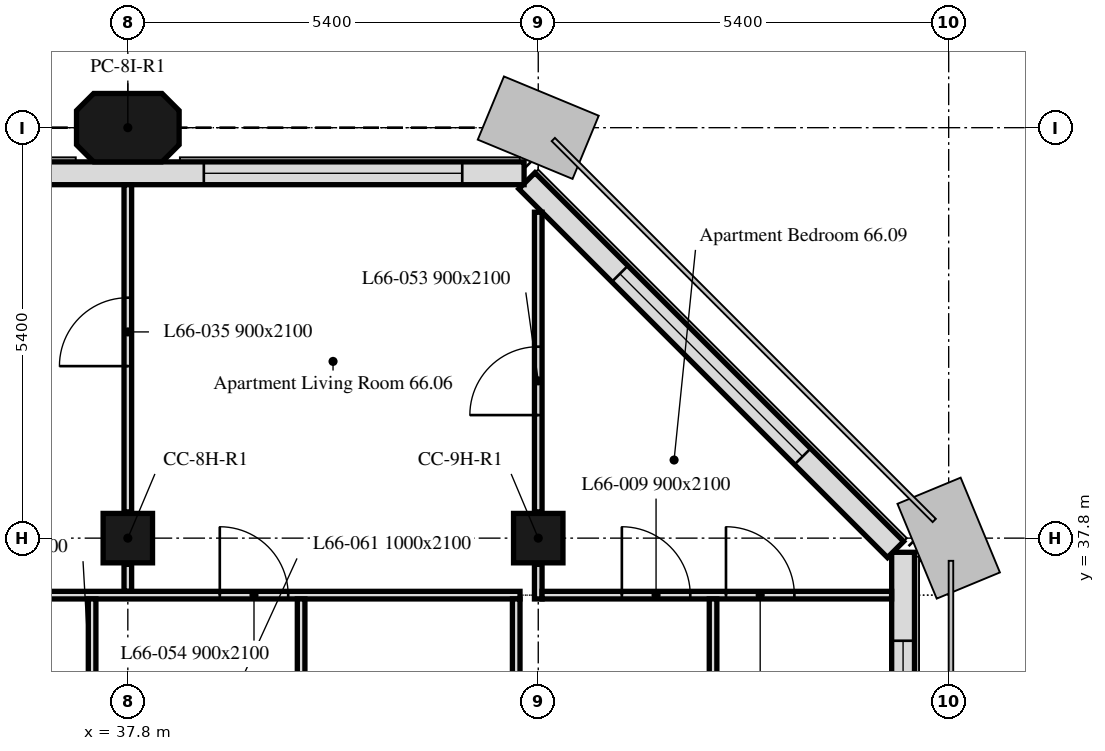
"""IFC4 building model, lengths in metres.
Left out: names, types, materials, properties, quantities, classifications, styles, units other than length and angle.
Written with IfcOpenShell. Run it as: python <this file> out.ifc"""

import sys

from ifc_helpers import new_model, si_unit, direction, frame, frame_2d, origin, origin_2d, place, context, subcontext, project, spatial, polyline, rectangle, outline, extrude, element, fill, save


model = new_model("IFC4")
c1 = context("Model", 3, precision=1e-05, world=origin(), true_north=direction((0.0, 1.0)))
c2 = subcontext(c1, "Body", "Model", "MODEL_VIEW")
j1 = project(units=[si_unit("LENGTHUNIT", "METRE"), si_unit("PLANEANGLEUNIT", "RADIAN")], contexts=[c1])
p1 = place(None, origin())
s1 = spatial("IfcSite", under=j1, at=p1, CompositionType="ELEMENT")
p2 = place(p1, origin())
s2 = spatial("IfcBuilding", under=s1, at=p2, CompositionType="ELEMENT")
p3 = place(p2, frame((0.0, 0.0, 271.9)))
s3 = spatial("IfcBuildingStorey", under=s2, at=p3, CompositionType="ELEMENT", Elevation=271.9)
for number, where, z_axis, x_axis in (
    (1, (37.8, 37.8, 0.0), (0.0, 0.0, 1.0), (1.0, 0.0, 0.0)),
    (2, (43.2, 37.8, 0.0), (0.0, 0.0, 1.0), (1.0, 0.0, 0.0)),
):
    element("IfcColumn", number, at=place(p3, frame(where, z_axis=z_axis, x_axis=x_axis)), inside=s3, PredefinedType="COLUMN", context=c2, shape_type="SweptSolid", body=[
        extrude(rectangle(XDim=0.65, YDim=0.65, at=origin_2d()), origin(), (0.0, 0.0, 1.0), 3.0),
    ])
p4 = place(p3, frame((37.8, 43.2, 0.0), z_axis=(0.0, 0.0, 1.0), x_axis=(1.0, 0.0, 0.0)))
e3 = element("IfcColumn", 3, at=p4, inside=s3, PredefinedType="COLUMN", context=c2, shape_type="SweptSolid", body=[
    extrude(outline(polyline([(-0.45, -0.45), (0.45, -0.45), (0.675, -0.225), (0.675, 0.225), (0.45, 0.45), (-0.45, 0.45), (-0.675, 0.225), (-0.675, -0.225), (-0.45, -0.45)])), origin(), (0.0, 0.0, 1.0), 3.0),
])
p5 = place(p3, frame((48.0, 5.586, 0.0), z_axis=(0.0, 0.0, 1.0), x_axis=(0.0, 1.0, 0.0)))
e4 = element("IfcWall", 4, at=p5, inside=s3, PredefinedType="SOLIDWALL", context=c2, shape_type="SweptSolid", body=[
    extrude(rectangle(XDim=32.027, YDim=0.3, at=frame_2d((16.014, 0.0))), origin(), (0.0, 0.0, 1.0), 3.0),
])
p6 = place(p5, frame((1.314, 0.0, 0.9)))
e5 = element("IfcOpeningElement", 5, at=p6, cuts=e4, PredefinedType="OPENING", context=c2, shape_type="SweptSolid", body=[
    extrude(rectangle(XDim=1.1, YDim=1.7, at=frame_2d((0.55, 0.85))), frame((0.0, 0.16, 0.0), z_axis=(0.0, -1.0, 0.0), x_axis=(1.0, 0.0, 0.0)), (0.0, 0.0, 1.0), 0.32),
])
p7 = place(p5, frame((2.764, 0.0, 0.9)))
e6 = element("IfcOpeningElement", 6, at=p7, cuts=e4, PredefinedType="OPENING", context=c2, shape_type="SweptSolid", body=[
    extrude(rectangle(XDim=1.1, YDim=1.7, at=frame_2d((0.55, 0.85))), frame((0.0, 0.16, 0.0), z_axis=(0.0, -1.0, 0.0), x_axis=(1.0, 0.0, 0.0)), (0.0, 0.0, 1.0), 0.32),
])
p8 = place(p5, frame((6.564, 0.0, 0.9)))
e7 = element("IfcOpeningElement", 7, at=p8, cuts=e4, PredefinedType="OPENING", context=c2, shape_type="SweptSolid", body=[
    extrude(rectangle(XDim=1.1, YDim=1.7, at=frame_2d((0.55, 0.85))), frame((0.0, 0.16, 0.0), z_axis=(0.0, -1.0, 0.0), x_axis=(1.0, 0.0, 0.0)), (0.0, 0.0, 1.0), 0.32),
])
p9 = place(p5, frame((8.514, 0.0, 0.9)))
e8 = element("IfcOpeningElement", 8, at=p9, cuts=e4, PredefinedType="OPENING", context=c2, shape_type="SweptSolid", body=[
    extrude(rectangle(XDim=1.1, YDim=1.7, at=frame_2d((0.55, 0.85))), frame((0.0, 0.16, 0.0), z_axis=(0.0, -1.0, 0.0), x_axis=(1.0, 0.0, 0.0)), (0.0, 0.0, 1.0), 0.32),
])
p10 = place(p5, frame((11.614, 0.0, 0.9)))
e9 = element("IfcOpeningElement", 9, at=p10, cuts=e4, PredefinedType="OPENING", context=c2, shape_type="SweptSolid", body=[
    extrude(rectangle(XDim=3.4, YDim=1.7, at=frame_2d((1.7, 0.85))), frame((0.0, 0.16, 0.0), z_axis=(0.0, -1.0, 0.0), x_axis=(1.0, 0.0, 0.0)), (0.0, 0.0, 1.0), 0.32),
])
p11 = place(p5, frame((17.364, 0.0, 0.9)))
e10 = element("IfcOpeningElement", 10, at=p11, cuts=e4, PredefinedType="OPENING", context=c2, shape_type="SweptSolid", body=[
    extrude(rectangle(XDim=1.1, YDim=1.7, at=frame_2d((0.55, 0.85))), frame((0.0, 0.16, 0.0), z_axis=(0.0, -1.0, 0.0), x_axis=(1.0, 0.0, 0.0)), (0.0, 0.0, 1.0), 0.32),
])
p12 = place(p5, frame((18.964, 0.0, 0.9)))
e11 = element("IfcOpeningElement", 11, at=p12, cuts=e4, PredefinedType="OPENING", context=c2, shape_type="SweptSolid", body=[
    extrude(rectangle(XDim=1.1, YDim=1.7, at=frame_2d((0.55, 0.85))), frame((0.0, 0.16, 0.0), z_axis=(0.0, -1.0, 0.0), x_axis=(1.0, 0.0, 0.0)), (0.0, 0.0, 1.0), 0.32),
])
p13 = place(p5, frame((22.414, 0.0, 0.9)))
e12 = element("IfcOpeningElement", 12, at=p13, cuts=e4, PredefinedType="OPENING", context=c2, shape_type="SweptSolid", body=[
    extrude(rectangle(XDim=3.4, YDim=1.7, at=frame_2d((1.7, 0.85))), frame((0.0, 0.16, 0.0), z_axis=(0.0, -1.0, 0.0), x_axis=(1.0, 0.0, 0.0)), (0.0, 0.0, 1.0), 0.32),
])
p14 = place(p5, frame((28.239, 0.0, 0.9)))
e13 = element("IfcOpeningElement", 13, at=p14, cuts=e4, PredefinedType="OPENING", context=c2, shape_type="SweptSolid", body=[
    extrude(rectangle(XDim=0.65, YDim=1.7, at=frame_2d((0.325, 0.85))), frame((0.0, 0.16, 0.0), z_axis=(0.0, -1.0, 0.0), x_axis=(1.0, 0.0, 0.0)), (0.0, 0.0, 1.0), 0.32),
])
p15 = place(p5, frame((29.764, 0.0, 0.9)))
e14 = element("IfcOpeningElement", 14, at=p15, cuts=e4, PredefinedType="OPENING", context=c2, shape_type="SweptSolid", body=[
    extrude(rectangle(XDim=1.1, YDim=1.7, at=frame_2d((0.55, 0.85))), frame((0.0, 0.16, 0.0), z_axis=(0.0, -1.0, 0.0), x_axis=(1.0, 0.0, 0.0)), (0.0, 0.0, 1.0), 0.32),
])
p16 = place(p3, frame((47.901, 37.65, 0.0), z_axis=(0.0, 0.0, 1.0), x_axis=(-0.707106781187, 0.707106781187, 0.0)))
e15 = element("IfcWall", 15, at=p16, inside=s3, PredefinedType="SOLIDWALL", context=c2, shape_type="SweptSolid", body=[
    extrude(rectangle(XDim=6.86, YDim=0.3, at=frame_2d((3.43, 0.0))), origin(), (0.0, 0.0, 1.0), 3.0),
])
p17 = place(p16, frame((1.73, 0.0, 0.9)))
e16 = element("IfcOpeningElement", 16, at=p17, cuts=e15, PredefinedType="OPENING", context=c2, shape_type="SweptSolid", body=[
    extrude(rectangle(XDim=3.4, YDim=1.7, at=frame_2d((1.7, 0.85))), frame((0.0, 0.16, 0.0), z_axis=(0.0, -1.0, 0.0), x_axis=(1.0, 0.0, 0.0)), (0.0, 0.0, 1.0), 0.32),
])
p18 = place(p3, frame((43.014, 42.6, 0.0), z_axis=(0.0, 0.0, 1.0), x_axis=(-1.0, 0.0, 0.0)))
e17 = element("IfcWall", 17, at=p18, inside=s3, PredefinedType="SOLIDWALL", context=c2, shape_type="SweptSolid", body=[
    extrude(rectangle(XDim=32.027, YDim=0.3, at=frame_2d((16.014, 0.0))), origin(), (0.0, 0.0, 1.0), 3.0),
])
p19 = place(p18, frame((0.814, 0.0, 0.9)))
e18 = element("IfcOpeningElement", 18, at=p19, cuts=e17, PredefinedType="OPENING", context=c2, shape_type="SweptSolid", body=[
    extrude(rectangle(XDim=3.4, YDim=1.7, at=frame_2d((1.7, 0.85))), frame((0.0, 0.16, 0.0), z_axis=(0.0, -1.0, 0.0), x_axis=(1.0, 0.0, 0.0)), (0.0, 0.0, 1.0), 0.32),
])
p20 = place(p18, frame((6.564, 0.0, 0.9)))
e19 = element("IfcOpeningElement", 19, at=p20, cuts=e17, PredefinedType="OPENING", context=c2, shape_type="SweptSolid", body=[
    extrude(rectangle(XDim=1.1, YDim=1.7, at=frame_2d((0.55, 0.85))), frame((0.0, 0.16, 0.0), z_axis=(0.0, -1.0, 0.0), x_axis=(1.0, 0.0, 0.0)), (0.0, 0.0, 1.0), 0.32),
])
p21 = place(p18, frame((11.614, 0.0, 0.9)))
e20 = element("IfcOpeningElement", 20, at=p21, cuts=e17, PredefinedType="OPENING", context=c2, shape_type="SweptSolid", body=[
    extrude(rectangle(XDim=3.4, YDim=1.7, at=frame_2d((1.7, 0.85))), frame((0.0, 0.16, 0.0), z_axis=(0.0, -1.0, 0.0), x_axis=(1.0, 0.0, 0.0)), (0.0, 0.0, 1.0), 0.32),
])
p22 = place(p18, frame((17.364, 0.0, 0.9)))
e21 = element("IfcOpeningElement", 21, at=p22, cuts=e17, PredefinedType="OPENING", context=c2, shape_type="SweptSolid", body=[
    extrude(rectangle(XDim=1.1, YDim=1.7, at=frame_2d((0.55, 0.85))), frame((0.0, 0.16, 0.0), z_axis=(0.0, -1.0, 0.0), x_axis=(1.0, 0.0, 0.0)), (0.0, 0.0, 1.0), 0.32),
])
p23 = place(p18, frame((22.414, 0.0, 0.9)))
e22 = element("IfcOpeningElement", 22, at=p23, cuts=e17, PredefinedType="OPENING", context=c2, shape_type="SweptSolid", body=[
    extrude(rectangle(XDim=3.4, YDim=1.7, at=frame_2d((1.7, 0.85))), frame((0.0, 0.16, 0.0), z_axis=(0.0, -1.0, 0.0), x_axis=(1.0, 0.0, 0.0)), (0.0, 0.0, 1.0), 0.32),
])
p24 = place(p18, frame((28.164, 0.0, 0.9)))
e23 = element("IfcOpeningElement", 23, at=p24, cuts=e17, PredefinedType="OPENING", context=c2, shape_type="SweptSolid", body=[
    extrude(rectangle(XDim=1.1, YDim=1.7, at=frame_2d((0.55, 0.85))), frame((0.0, 0.16, 0.0), z_axis=(0.0, -1.0, 0.0), x_axis=(1.0, 0.0, 0.0)), (0.0, 0.0, 1.0), 0.32),
])
p25 = place(p3, frame((37.8, 37.1, 0.0), z_axis=(0.0, 0.0, 1.0), x_axis=(0.0, 1.0, 0.0)))
e24 = element("IfcWall", 24, at=p25, inside=s3, PredefinedType="PARTITIONING", context=c2, shape_type="SweptSolid", body=[
    extrude(rectangle(XDim=0.355, YDim=0.1, at=frame_2d((0.177, 0.0))), origin(), (0.0, 0.0, 1.0), 3.0),
])
p26 = place(p3, frame((37.8, 38.145, 0.0), z_axis=(0.0, 0.0, 1.0), x_axis=(0.0, 1.0, 0.0)))
e25 = element("IfcWall", 25, at=p26, inside=s3, PredefinedType="PARTITIONING", context=c2, shape_type="SweptSolid", body=[
    extrude(rectangle(XDim=4.304, YDim=0.1, at=frame_2d((2.152, 0.0))), origin(), (0.0, 0.0, 1.0), 3.0),
])
p27 = place(p26, frame((1.918, 0.0, 0.0)))
e26 = element("IfcOpeningElement", 26, at=p27, cuts=e25, PredefinedType="OPENING", context=c2, shape_type="SweptSolid", body=[
    extrude(rectangle(XDim=0.9, YDim=2.1, at=frame_2d((0.45, 1.05))), frame((0.0, 0.05, 0.0), z_axis=(0.0, -1.0, 0.0), x_axis=(1.0, 0.0, 0.0)), (0.0, 0.0, 1.0), 0.1),
])
p28 = place(p3, frame((32.475, 37.05, 0.0), z_axis=(0.0, 0.0, 1.0), x_axis=(1.0, 0.0, 0.0)))
e27 = element("IfcWall", 27, at=p28, inside=s3, PredefinedType="PARTITIONING", context=c2, shape_type="SweptSolid", body=[
    extrude(rectangle(XDim=10.485, YDim=0.1, at=frame_2d((5.242, 0.0))), origin(), (0.0, 0.0, 1.0), 3.0),
])
p29 = place(p28, frame((1.275, 0.0, 0.0)))
e28 = element("IfcOpeningElement", 28, at=p29, cuts=e27, PredefinedType="OPENING", context=c2, shape_type="SweptSolid", body=[
    extrude(rectangle(XDim=0.9, YDim=2.1, at=frame_2d((0.45, 1.05))), frame((0.0, 0.05, 0.0), z_axis=(0.0, -1.0, 0.0), x_axis=(1.0, 0.0, 0.0)), (0.0, 0.0, 1.0), 0.1),
])
p30 = place(p28, frame((6.535, 0.0, 0.0)))
e29 = element("IfcOpeningElement", 29, at=p30, cuts=e27, PredefinedType="OPENING", context=c2, shape_type="SweptSolid", body=[
    extrude(rectangle(XDim=0.9, YDim=2.1, at=frame_2d((0.45, 1.05))), frame((0.0, 0.05, 0.0), z_axis=(0.0, -1.0, 0.0), x_axis=(1.0, 0.0, 0.0)), (0.0, 0.0, 1.0), 0.1),
])
p31 = place(p3, frame((43.2, 37.0, 0.0), z_axis=(0.0, 0.0, 1.0), x_axis=(0.0, 1.0, 0.0)))
e30 = element("IfcWall", 30, at=p31, inside=s3, PredefinedType="PARTITIONING", context=c2, shape_type="SweptSolid", body=[
    extrude(rectangle(XDim=0.455, YDim=0.1, at=frame_2d((0.228, 0.0))), origin(), (0.0, 0.0, 1.0), 3.0),
])
p32 = place(p3, frame((43.2, 38.145, 0.0), z_axis=(0.0, 0.0, 1.0), x_axis=(0.0, 1.0, 0.0)))
e31 = element("IfcWall", 31, at=p32, inside=s3, PredefinedType="PARTITIONING", context=c2, shape_type="SweptSolid", body=[
    extrude(rectangle(XDim=3.943, YDim=0.1, at=frame_2d((1.971, 0.0))), origin(), (0.0, 0.0, 1.0), 3.0),
])
p33 = place(p32, frame((1.274, 0.0, 0.0)))
e32 = element("IfcOpeningElement", 32, at=p33, cuts=e31, PredefinedType="OPENING", context=c2, shape_type="SweptSolid", body=[
    extrude(rectangle(XDim=0.9, YDim=2.1, at=frame_2d((0.45, 1.05))), frame((0.0, 0.05, 0.0), z_axis=(0.0, -1.0, 0.0), x_axis=(1.0, 0.0, 0.0)), (0.0, 0.0, 1.0), 0.1),
])
p34 = place(p3, frame((43.25, 37.05, 0.0), z_axis=(0.0, 0.0, 1.0), x_axis=(1.0, 0.0, 0.0)))
e33 = element("IfcWall", 33, at=p34, inside=s3, PredefinedType="PARTITIONING", context=c2, shape_type="SweptSolid", body=[
    extrude(rectangle(XDim=4.599, YDim=0.1, at=frame_2d((2.3, 0.0))), origin(), (0.0, 0.0, 1.0), 3.0),
])
p35 = place(p34, frame((1.05, 0.0, 0.0)))
e34 = element("IfcOpeningElement", 34, at=p35, cuts=e33, PredefinedType="OPENING", context=c2, shape_type="SweptSolid", body=[
    extrude(rectangle(XDim=0.9, YDim=2.1, at=frame_2d((0.45, 1.05))), frame((0.0, 0.05, 0.0), z_axis=(0.0, -1.0, 0.0), x_axis=(1.0, 0.0, 0.0)), (0.0, 0.0, 1.0), 0.1),
])
p36 = place(p34, frame((2.42, 0.0, 0.0)))
e35 = element("IfcOpeningElement", 35, at=p36, cuts=e33, PredefinedType="OPENING", context=c2, shape_type="SweptSolid", body=[
    extrude(rectangle(XDim=0.9, YDim=2.1, at=frame_2d((0.45, 1.05))), frame((0.0, 0.05, 0.0), z_axis=(0.0, -1.0, 0.0), x_axis=(1.0, 0.0, 0.0)), (0.0, 0.0, 1.0), 0.1),
])
p37 = place(p3, frame((37.33, 34.725, 0.0), z_axis=(0.0, 0.0, 1.0), x_axis=(0.0, 1.0, 0.0)))
e36 = element("IfcWall", 36, at=p37, inside=s3, PredefinedType="PARTITIONING", context=c2, shape_type="SweptSolid", body=[
    extrude(rectangle(XDim=2.275, YDim=0.1, at=frame_2d((1.137, 0.0))), origin(), (0.0, 0.0, 1.0), 3.0),
])
p38 = place(p37, frame((0.25, 0.0, 0.0)))
e37 = element("IfcOpeningElement", 37, at=p38, cuts=e36, PredefinedType="OPENING", context=c2, shape_type="SweptSolid", body=[
    extrude(rectangle(XDim=0.9, YDim=2.1, at=frame_2d((0.45, 1.05))), frame((0.0, 0.05, 0.0), z_axis=(0.0, -1.0, 0.0), x_axis=(1.0, 0.0, 0.0)), (0.0, 0.0, 1.0), 0.1),
])
p39 = place(p3, frame((40.08, 34.725, 0.0), z_axis=(0.0, 0.0, 1.0), x_axis=(0.0, 1.0, 0.0)))
e38 = element("IfcWall", 38, at=p39, inside=s3, PredefinedType="PARTITIONING", context=c2, shape_type="SweptSolid", body=[
    extrude(rectangle(XDim=2.275, YDim=0.1, at=frame_2d((1.137, 0.0))), origin(), (0.0, 0.0, 1.0), 3.0),
])
p40 = place(p39, frame((0.25, 0.0, 0.0)))
e39 = element("IfcOpeningElement", 39, at=p40, cuts=e38, PredefinedType="OPENING", context=c2, shape_type="SweptSolid", body=[
    extrude(rectangle(XDim=0.9, YDim=2.1, at=frame_2d((0.45, 1.05))), frame((0.0, 0.05, 0.0), z_axis=(0.0, -1.0, 0.0), x_axis=(1.0, 0.0, 0.0)), (0.0, 0.0, 1.0), 0.1),
])
for number, where, z_axis, x_axis in (
    (40, (42.91, 34.725, 0.0), (0.0, 0.0, 1.0), (0.0, 1.0, 0.0)),
    (41, (45.5, 34.725, 0.0), (0.0, 0.0, 1.0), (0.0, 1.0, 0.0)),
):
    element("IfcWall", number, at=place(p3, frame(where, z_axis=z_axis, x_axis=x_axis)), inside=s3, PredefinedType="PARTITIONING", context=c2, shape_type="SweptSolid", body=[
        extrude(rectangle(XDim=2.275, YDim=0.1, at=frame_2d((1.137, 0.0))), origin(), (0.0, 0.0, 1.0), 3.0),
    ])
p41 = place(p15, origin())
e42 = element("IfcWindow", 42, at=p41, inside=s3, PartitioningType="SINGLE_PANEL", PredefinedType="WINDOW", context=c2, shape_type="SweptSolid", body=[
    extrude(rectangle(XDim=1.1, YDim=1.7, at=frame_2d((0.55, 0.85))), frame((0.0, 0.03, 0.0), z_axis=(0.0, -1.0, 0.0), x_axis=(1.0, 0.0, 0.0)), (0.0, 0.0, 1.0), 0.06),
])
fill(e14, e42)
p42 = place(p17, origin())
e43 = element("IfcWindow", 43, at=p42, inside=s3, PartitioningType="SINGLE_PANEL", PredefinedType="WINDOW", context=c2, shape_type="SweptSolid", body=[
    extrude(rectangle(XDim=3.4, YDim=1.7, at=frame_2d((1.7, 0.85))), frame((0.0, 0.03, 0.0), z_axis=(0.0, -1.0, 0.0), x_axis=(1.0, 0.0, 0.0)), (0.0, 0.0, 1.0), 0.06),
])
fill(e16, e43)
p43 = place(p19, origin())
e44 = element("IfcWindow", 44, at=p43, inside=s3, PartitioningType="SINGLE_PANEL", PredefinedType="WINDOW", context=c2, shape_type="SweptSolid", body=[
    extrude(rectangle(XDim=3.4, YDim=1.7, at=frame_2d((1.7, 0.85))), frame((0.0, 0.03, 0.0), z_axis=(0.0, -1.0, 0.0), x_axis=(1.0, 0.0, 0.0)), (0.0, 0.0, 1.0), 0.06),
])
fill(e18, e44)
p44 = place(p35, origin())
e45 = element("IfcDoor", 45, at=p44, inside=s3, OperationType="SINGLE_SWING_LEFT", PredefinedType="DOOR", context=c2, shape_type="SweptSolid", body=[
    extrude(rectangle(XDim=0.9, YDim=2.1, at=frame_2d((0.45, 1.05))), frame((0.0, 0.025, 0.0), z_axis=(0.0, -1.0, 0.0), x_axis=(1.0, 0.0, 0.0)), (0.0, 0.0, 1.0), 0.05),
])
fill(e34, e45)
p45 = place(p36, origin())
e46 = element("IfcDoor", 46, at=p45, inside=s3, OperationType="SINGLE_SWING_RIGHT", PredefinedType="DOOR", context=c2, shape_type="SweptSolid", body=[
    extrude(rectangle(XDim=0.9, YDim=2.1, at=frame_2d((0.45, 1.05))), frame((0.0, 0.025, 0.0), z_axis=(0.0, -1.0, 0.0), x_axis=(1.0, 0.0, 0.0)), (0.0, 0.0, 1.0), 0.05),
])
fill(e35, e46)
p46 = place(p27, origin())
e47 = element("IfcDoor", 47, at=p46, inside=s3, OperationType="SINGLE_SWING_RIGHT", PredefinedType="DOOR", context=c2, shape_type="SweptSolid", body=[
    extrude(rectangle(XDim=0.9, YDim=2.1, at=frame_2d((0.45, 1.05))), frame((0.0, 0.025, 0.0), z_axis=(0.0, -1.0, 0.0), x_axis=(1.0, 0.0, 0.0)), (0.0, 0.0, 1.0), 0.05),
])
fill(e26, e47)
p47 = place(p33, origin())
e48 = element("IfcDoor", 48, at=p47, inside=s3, OperationType="SINGLE_SWING_LEFT", PredefinedType="DOOR", context=c2, shape_type="SweptSolid", body=[
    extrude(rectangle(XDim=0.9, YDim=2.1, at=frame_2d((0.45, 1.05))), frame((0.0, 0.025, 0.0), z_axis=(0.0, -1.0, 0.0), x_axis=(1.0, 0.0, 0.0)), (0.0, 0.0, 1.0), 0.05),
])
fill(e32, e48)
p48 = place(p30, origin())
e49 = element("IfcDoor", 49, at=p48, inside=s3, OperationType="SINGLE_SWING_RIGHT", PredefinedType="DOOR", context=c2, shape_type="SweptSolid", body=[
    extrude(rectangle(XDim=0.9, YDim=2.1, at=frame_2d((0.45, 1.05))), frame((0.0, 0.025, 0.0), z_axis=(0.0, -1.0, 0.0), x_axis=(1.0, 0.0, 0.0)), (0.0, 0.0, 1.0), 0.05),
])
fill(e29, e49)
save(model, sys.argv[1])
